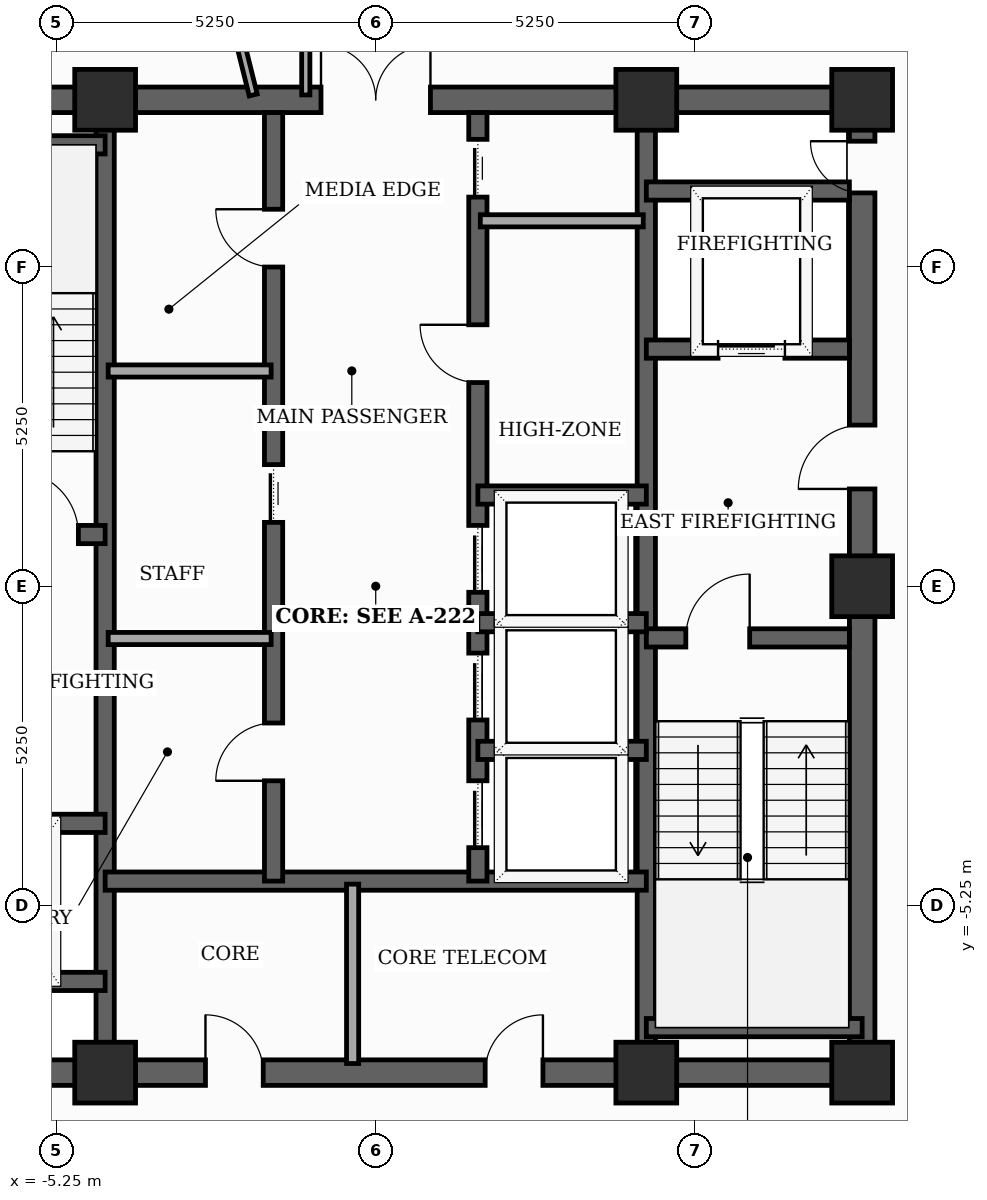
"""IFC4 building model, lengths in metres.
Left out: names, types, materials, properties, quantities, classifications, styles, units other than length and angle.
Written with IfcOpenShell. Run it as: python <this file> out.ifc"""

import sys

from ifc_helpers import new_model, si_unit, direction, frame, frame_2d, origin, origin_2d, place, context, subcontext, project, spatial, rectangle, extrude, element, fill, save


model = new_model("IFC4")
c1 = context("Model", 3, precision=1e-05, world=origin(), true_north=direction((0.0, 1.0)))
c2 = subcontext(c1, "Body", "Model", "MODEL_VIEW")
j1 = project(units=[si_unit("LENGTHUNIT", "METRE"), si_unit("PLANEANGLEUNIT", "RADIAN")], contexts=[c1])
p1 = place(None, origin())
s1 = spatial("IfcSite", under=j1, at=p1, CompositionType="ELEMENT")
p2 = place(p1, origin())
s2 = spatial("IfcBuilding", under=s1, at=p2, CompositionType="ELEMENT")
p3 = place(p2, frame((0.0, 0.0, 290.6)))
s3 = spatial("IfcBuildingStorey", under=s2, at=p3, CompositionType="ELEMENT", Elevation=290.6)
for number, where, z_axis, x_axis in (
    (1, (-4.45, -8.0, 0.0), (0.0, 0.0, 1.0), (1.0, 0.0, 0.0)),
    (2, (4.45, -8.0, 0.0), (0.0, 0.0, 1.0), (1.0, 0.0, 0.0)),
    (3, (8.0, -8.0, 0.0), (0.0, 0.0, 1.0), (1.0, 0.0, 0.0)),
    (4, (8.0, 0.0, 0.0), (0.0, 0.0, 1.0), (1.0, 0.0, 0.0)),
    (5, (8.0, 8.0, 0.0), (0.0, 0.0, 1.0), (1.0, 0.0, 0.0)),
    (6, (4.45, 8.0, 0.0), (0.0, 0.0, 1.0), (1.0, 0.0, 0.0)),
    (7, (-4.45, 8.0, 0.0), (0.0, 0.0, 1.0), (1.0, 0.0, 0.0)),
):
    element("IfcColumn", number, at=place(p3, frame(where, z_axis=z_axis, x_axis=x_axis)), inside=s3, PredefinedType="COLUMN", context=c2, shape_type="SweptSolid", body=[
        extrude(rectangle(XDim=1.0, YDim=1.0, at=origin_2d()), origin(), (0.0, 0.0, 1.0), 3.7),
    ])
p4 = place(p3, frame((8.0, -8.0, 0.0), z_axis=(0.0, 0.0, 1.0), x_axis=(0.0, 1.0, 0.0)))
e8 = element("IfcWall", 8, at=p4, inside=s3, PredefinedType="SHEAR", context=c2, shape_type="SweptSolid", body=[
    extrude(rectangle(XDim=16.0, YDim=0.42, at=frame_2d((8.0, 0.0))), origin(), (0.0, 0.0, 1.0), 3.5),
])
p5 = place(p4, frame((9.6, 0.0, 0.0)))
e9 = element("IfcOpeningElement", 9, at=p5, cuts=e8, PredefinedType="OPENING", context=c2, shape_type="SweptSolid", body=[
    extrude(rectangle(XDim=1.05, YDim=2.15, at=frame_2d((0.525, 1.075))), frame((0.0, 0.22, 0.0), z_axis=(0.0, -1.0, 0.0), x_axis=(1.0, 0.0, 0.0)), (0.0, 0.0, 1.0), 0.44),
])
p6 = place(p4, frame((14.469, 0.0, 0.0)))
e10 = element("IfcOpeningElement", 10, at=p6, cuts=e8, PredefinedType="OPENING", context=c2, shape_type="SweptSolid", body=[
    extrude(rectangle(XDim=0.85, YDim=2.02, at=frame_2d((0.425, 1.01))), frame((0.0, 0.22, 0.0), z_axis=(0.0, -1.0, 0.0), x_axis=(1.0, 0.0, 0.0)), (0.0, 0.0, 1.0), 0.44),
])
p7 = place(p3, frame((-8.0, -8.0, 0.0), z_axis=(0.0, 0.0, 1.0), x_axis=(1.0, 0.0, 0.0)))
e11 = element("IfcWall", 11, at=p7, inside=s3, PredefinedType="SHEAR", context=c2, shape_type="SweptSolid", body=[
    extrude(rectangle(XDim=16.0, YDim=0.42, at=frame_2d((8.0, 0.0))), origin(), (0.0, 0.0, 1.0), 3.5),
])
p8 = place(p7, frame((5.2, 0.0, 0.0)))
e12 = element("IfcOpeningElement", 12, at=p8, cuts=e11, PredefinedType="OPENING", context=c2, shape_type="SweptSolid", body=[
    extrude(rectangle(XDim=0.95, YDim=2.1, at=frame_2d((0.475, 1.05))), frame((0.0, 0.22, 0.0), z_axis=(0.0, -1.0, 0.0), x_axis=(1.0, 0.0, 0.0)), (0.0, 0.0, 1.0), 0.44),
])
p9 = place(p7, frame((9.8, 0.0, 0.0)))
e13 = element("IfcOpeningElement", 13, at=p9, cuts=e11, PredefinedType="OPENING", context=c2, shape_type="SweptSolid", body=[
    extrude(rectangle(XDim=0.95, YDim=2.1, at=frame_2d((0.475, 1.05))), frame((0.0, 0.22, 0.0), z_axis=(0.0, -1.0, 0.0), x_axis=(1.0, 0.0, 0.0)), (0.0, 0.0, 1.0), 0.44),
])
p10 = place(p3, frame((-8.0, 8.0, 0.0), z_axis=(0.0, 0.0, 1.0), x_axis=(1.0, 0.0, 0.0)))
e14 = element("IfcWall", 14, at=p10, inside=s3, PredefinedType="SHEAR", context=c2, shape_type="SweptSolid", body=[
    extrude(rectangle(XDim=16.0, YDim=0.42, at=frame_2d((8.0, 0.0))), origin(), (0.0, 0.0, 1.0), 3.5),
])
p11 = place(p10, frame((7.1, 0.0, 0.0)))
e15 = element("IfcOpeningElement", 15, at=p11, cuts=e14, PredefinedType="OPENING", context=c2, shape_type="SweptSolid", body=[
    extrude(rectangle(XDim=1.8, YDim=2.15, at=frame_2d((0.9, 1.075))), frame((0.0, 0.22, 0.0), z_axis=(0.0, -1.0, 0.0), x_axis=(1.0, 0.0, 0.0)), (0.0, 0.0, 1.0), 0.44),
])
for number, where, z_axis, x_axis in (
    (16, (-4.45, -7.79, 0.0), (0.0, 0.0, 1.0), (0.0, 1.0, 0.0)),
    (17, (4.45, -7.79, 0.0), (0.0, 0.0, 1.0), (0.0, 1.0, 0.0)),
):
    element("IfcWall", number, at=place(p3, frame(where, z_axis=z_axis, x_axis=x_axis)), inside=s3, PredefinedType="SHEAR", context=c2, shape_type="SweptSolid", body=[
        extrude(rectangle(XDim=15.58, YDim=0.3, at=frame_2d((7.79, 0.0))), origin(), (0.0, 0.0, 1.0), 3.5),
    ])
p12 = place(p3, frame((-7.79, 0.85, 0.0), z_axis=(0.0, 0.0, 1.0), x_axis=(1.0, 0.0, 0.0)))
e18 = element("IfcWall", 18, at=p12, inside=s3, PredefinedType="SHEAR", context=c2, shape_type="SweptSolid", body=[
    extrude(rectangle(XDim=3.34, YDim=0.3, at=frame_2d((1.67, 0.0))), origin(), (0.0, 0.0, 1.0), 3.5),
])
p13 = place(p12, frame((1.85, 0.0, 0.0)))
e19 = element("IfcOpeningElement", 19, at=p13, cuts=e18, PredefinedType="OPENING", context=c2, shape_type="SweptSolid", body=[
    extrude(rectangle(XDim=1.05, YDim=2.15, at=frame_2d((0.525, 1.075))), frame((0.0, 0.16, 0.0), z_axis=(0.0, -1.0, 0.0), x_axis=(1.0, 0.0, 0.0)), (0.0, 0.0, 1.0), 0.32),
])
p14 = place(p3, frame((-7.79, 7.26, 0.0), z_axis=(0.0, 0.0, 1.0), x_axis=(1.0, 0.0, 0.0)))
e20 = element("IfcWall", 20, at=p14, inside=s3, PredefinedType="SHEAR", context=c2, shape_type="SweptSolid", body=[
    extrude(rectangle(XDim=3.34, YDim=0.3, at=frame_2d((1.67, 0.0))), origin(), (0.0, 0.0, 1.0), 3.5),
])
p15 = place(p3, frame((4.45, -0.85, 0.0), z_axis=(0.0, 0.0, 1.0), x_axis=(1.0, 0.0, 0.0)))
e21 = element("IfcWall", 21, at=p15, inside=s3, PredefinedType="SHEAR", context=c2, shape_type="SweptSolid", body=[
    extrude(rectangle(XDim=3.34, YDim=0.3, at=frame_2d((1.67, 0.0))), origin(), (0.0, 0.0, 1.0), 3.5),
])
p16 = place(p15, frame((0.65, 0.0, 0.0)))
e22 = element("IfcOpeningElement", 22, at=p16, cuts=e21, PredefinedType="OPENING", context=c2, shape_type="SweptSolid", body=[
    extrude(rectangle(XDim=1.05, YDim=2.15, at=frame_2d((0.525, 1.075))), frame((0.0, 0.16, 0.0), z_axis=(0.0, -1.0, 0.0), x_axis=(1.0, 0.0, 0.0)), (0.0, 0.0, 1.0), 0.32),
])
p17 = place(p3, frame((4.45, -7.26, 0.0), z_axis=(0.0, 0.0, 1.0), x_axis=(1.0, 0.0, 0.0)))
e23 = element("IfcWall", 23, at=p17, inside=s3, PredefinedType="SHEAR", context=c2, shape_type="SweptSolid", body=[
    extrude(rectangle(XDim=3.55, YDim=0.3, at=frame_2d((1.775, 0.0))), origin(), (0.0, 0.0, 1.0), 3.5),
])
p18 = place(p3, frame((-7.79, -3.9, 0.0), z_axis=(0.0, 0.0, 1.0), x_axis=(1.0, 0.0, 0.0)))
e24 = element("IfcWall", 24, at=p18, inside=s3, PredefinedType="SHEAR", context=c2, shape_type="SweptSolid", body=[
    extrude(rectangle(XDim=3.34, YDim=0.3, at=frame_2d((1.67, 0.0))), origin(), (0.0, 0.0, 1.0), 3.5),
])
p19 = place(p18, frame((1.27, 0.0, 0.0)))
e25 = element("IfcOpeningElement", 25, at=p19, cuts=e24, PredefinedType="OPENING", context=c2, shape_type="SweptSolid", body=[
    extrude(rectangle(XDim=1.1, YDim=2.1, at=frame_2d((0.55, 1.05))), frame((0.0, 0.16, 0.0), z_axis=(0.0, -1.0, 0.0), x_axis=(1.0, 0.0, 0.0)), (0.0, 0.0, 1.0), 0.32),
])
p20 = place(p3, frame((-7.79, -6.5, 0.0), z_axis=(0.0, 0.0, 1.0), x_axis=(1.0, 0.0, 0.0)))
e26 = element("IfcWall", 26, at=p20, inside=s3, PredefinedType="SHEAR", context=c2, shape_type="SweptSolid", body=[
    extrude(rectangle(XDim=3.34, YDim=0.3, at=frame_2d((1.67, 0.0))), origin(), (0.0, 0.0, 1.0), 3.5),
])
p21 = place(p3, frame((4.45, 3.9, 0.0), z_axis=(0.0, 0.0, 1.0), x_axis=(1.0, 0.0, 0.0)))
e27 = element("IfcWall", 27, at=p21, inside=s3, PredefinedType="SHEAR", context=c2, shape_type="SweptSolid", body=[
    extrude(rectangle(XDim=3.34, YDim=0.3, at=frame_2d((1.67, 0.0))), origin(), (0.0, 0.0, 1.0), 3.5),
])
p22 = place(p21, frame((1.18, 0.0, 0.0)))
e28 = element("IfcOpeningElement", 28, at=p22, cuts=e27, PredefinedType="OPENING", context=c2, shape_type="SweptSolid", body=[
    extrude(rectangle(XDim=1.1, YDim=2.1, at=frame_2d((0.55, 1.05))), frame((0.0, 0.16, 0.0), z_axis=(0.0, -1.0, 0.0), x_axis=(1.0, 0.0, 0.0)), (0.0, 0.0, 1.0), 0.32),
])
p23 = place(p3, frame((4.45, 6.5, 0.0), z_axis=(0.0, 0.0, 1.0), x_axis=(1.0, 0.0, 0.0)))
e29 = element("IfcWall", 29, at=p23, inside=s3, PredefinedType="SHEAR", context=c2, shape_type="SweptSolid", body=[
    extrude(rectangle(XDim=3.34, YDim=0.3, at=frame_2d((1.67, 0.0))), origin(), (0.0, 0.0, 1.0), 3.5),
])
p24 = place(p3, frame((-4.45, -4.85, 0.0), z_axis=(0.0, 0.0, 1.0), x_axis=(1.0, 0.0, 0.0)))
e30 = element("IfcWall", 30, at=p24, inside=s3, PredefinedType="SHEAR", context=c2, shape_type="SweptSolid", body=[
    extrude(rectangle(XDim=8.9, YDim=0.3, at=frame_2d((4.45, 0.0))), origin(), (0.0, 0.0, 1.0), 3.5),
])
p25 = place(p3, frame((-1.68, -4.85, 0.0), z_axis=(0.0, 0.0, 1.0), x_axis=(0.0, 1.0, 0.0)))
e31 = element("IfcWall", 31, at=p25, inside=s3, PredefinedType="SHEAR", context=c2, shape_type="SweptSolid", body=[
    extrude(rectangle(XDim=12.64, YDim=0.3, at=frame_2d((6.32, 0.0))), origin(), (0.0, 0.0, 1.0), 3.5),
])
p26 = place(p25, frame((1.65, 0.0, 0.0)))
e32 = element("IfcOpeningElement", 32, at=p26, cuts=e31, PredefinedType="OPENING", context=c2, shape_type="SweptSolid", body=[
    extrude(rectangle(XDim=0.95, YDim=2.1, at=frame_2d((0.475, 1.05))), frame((0.0, 0.16, 0.0), z_axis=(0.0, -1.0, 0.0), x_axis=(1.0, 0.0, 0.0)), (0.0, 0.0, 1.0), 0.32),
])
p27 = place(p25, frame((5.9, 0.0, 0.0)))
e33 = element("IfcOpeningElement", 33, at=p27, cuts=e31, PredefinedType="OPENING", context=c2, shape_type="SweptSolid", body=[
    extrude(rectangle(XDim=0.95, YDim=2.1, at=frame_2d((0.475, 1.05))), frame((0.0, 0.16, 0.0), z_axis=(0.0, -1.0, 0.0), x_axis=(1.0, 0.0, 0.0)), (0.0, 0.0, 1.0), 0.32),
])
p28 = place(p25, frame((10.1, 0.0, 0.0)))
e34 = element("IfcOpeningElement", 34, at=p28, cuts=e31, PredefinedType="OPENING", context=c2, shape_type="SweptSolid", body=[
    extrude(rectangle(XDim=0.95, YDim=2.1, at=frame_2d((0.475, 1.05))), frame((0.0, 0.16, 0.0), z_axis=(0.0, -1.0, 0.0), x_axis=(1.0, 0.0, 0.0)), (0.0, 0.0, 1.0), 0.32),
])
p29 = place(p3, frame((1.68, -4.85, 0.0), z_axis=(0.0, 0.0, 1.0), x_axis=(0.0, 1.0, 0.0)))
e35 = element("IfcWall", 35, at=p29, inside=s3, PredefinedType="SHEAR", context=c2, shape_type="SweptSolid", body=[
    extrude(rectangle(XDim=12.64, YDim=0.3, at=frame_2d((6.32, 0.0))), origin(), (0.0, 0.0, 1.0), 3.5),
])
p30 = place(p29, frame((0.55, 0.0, 0.0)))
e36 = element("IfcOpeningElement", 36, at=p30, cuts=e35, PredefinedType="OPENING", context=c2, shape_type="SweptSolid", body=[
    extrude(rectangle(XDim=1.1, YDim=2.1, at=frame_2d((0.55, 1.05))), frame((0.0, 0.16, 0.0), z_axis=(0.0, -1.0, 0.0), x_axis=(1.0, 0.0, 0.0)), (0.0, 0.0, 1.0), 0.32),
])
p31 = place(p29, frame((2.65, 0.0, 0.0)))
e37 = element("IfcOpeningElement", 37, at=p31, cuts=e35, PredefinedType="OPENING", context=c2, shape_type="SweptSolid", body=[
    extrude(rectangle(XDim=1.1, YDim=2.1, at=frame_2d((0.55, 1.05))), frame((0.0, 0.16, 0.0), z_axis=(0.0, -1.0, 0.0), x_axis=(1.0, 0.0, 0.0)), (0.0, 0.0, 1.0), 0.32),
])
p32 = place(p29, frame((4.75, 0.0, 0.0)))
e38 = element("IfcOpeningElement", 38, at=p32, cuts=e35, PredefinedType="OPENING", context=c2, shape_type="SweptSolid", body=[
    extrude(rectangle(XDim=1.1, YDim=2.1, at=frame_2d((0.55, 1.05))), frame((0.0, 0.16, 0.0), z_axis=(0.0, -1.0, 0.0), x_axis=(1.0, 0.0, 0.0)), (0.0, 0.0, 1.0), 0.32),
])
p33 = place(p29, frame((8.2, 0.0, 0.0)))
e39 = element("IfcOpeningElement", 39, at=p33, cuts=e35, PredefinedType="OPENING", context=c2, shape_type="SweptSolid", body=[
    extrude(rectangle(XDim=0.95, YDim=2.1, at=frame_2d((0.475, 1.05))), frame((0.0, 0.16, 0.0), z_axis=(0.0, -1.0, 0.0), x_axis=(1.0, 0.0, 0.0)), (0.0, 0.0, 1.0), 0.32),
])
p34 = place(p29, frame((11.25, 0.0, 0.0)))
e40 = element("IfcOpeningElement", 40, at=p34, cuts=e35, PredefinedType="OPENING", context=c2, shape_type="SweptSolid", body=[
    extrude(rectangle(XDim=0.95, YDim=2.1, at=frame_2d((0.475, 1.05))), frame((0.0, 0.16, 0.0), z_axis=(0.0, -1.0, 0.0), x_axis=(1.0, 0.0, 0.0)), (0.0, 0.0, 1.0), 0.32),
])
for number, where, z_axis, x_axis in (
    (41, (1.68, 1.5, 0.0), (0.0, 0.0, 1.0), (1.0, 0.0, 0.0)),
    (42, (1.68, -2.7, 0.0), (0.0, 0.0, 1.0), (1.0, 0.0, 0.0)),
    (43, (1.68, -0.6, 0.0), (0.0, 0.0, 1.0), (1.0, 0.0, 0.0)),
):
    element("IfcWall", number, at=place(p3, frame(where, z_axis=z_axis, x_axis=x_axis)), inside=s3, PredefinedType="SHEAR", context=c2, shape_type="SweptSolid", body=[
        extrude(rectangle(XDim=2.77, YDim=0.3, at=frame_2d((1.385, 0.0))), origin(), (0.0, 0.0, 1.0), 3.5),
    ])
p35 = place(p3, frame((-0.38, -7.85, 0.0), z_axis=(0.0, 0.0, 1.0), x_axis=(0.0, 1.0, 0.0)))
e44 = element("IfcWall", 44, at=p35, inside=s3, PredefinedType="SOLIDWALL", context=c2, shape_type="SweptSolid", body=[
    extrude(rectangle(XDim=2.95, YDim=0.2, at=frame_2d((1.475, 0.0))), origin(), (0.0, 0.0, 1.0), 2.885),
])
for number, where, z_axis, x_axis in (
    (45, (-4.4, -0.86, 0.0), (0.0, 0.0, 1.0), (1.0, 0.0, 0.0)),
    (46, (-4.4, 3.54, 0.0), (0.0, 0.0, 1.0), (1.0, 0.0, 0.0)),
    (47, (1.72, 6.01, 0.0), (0.0, 0.0, 1.0), (1.0, 0.0, 0.0)),
):
    element("IfcWall", number, at=place(p3, frame(where, z_axis=z_axis, x_axis=x_axis)), inside=s3, PredefinedType="SOLIDWALL", context=c2, shape_type="SweptSolid", body=[
        extrude(rectangle(XDim=2.68, YDim=0.2, at=frame_2d((1.34, 0.0))), origin(), (0.0, 0.0, 1.0), 3.5),
    ])
p36 = place(p3, frame((-1.15, 10.65, 0.0), z_axis=(0.0, 0.0, 1.0), x_axis=(0.0, -1.0, 0.0)))
e48 = element("IfcWall", 48, at=p36, inside=s3, PredefinedType="PARTITIONING", context=c2, shape_type="SweptSolid", body=[
    extrude(rectangle(XDim=2.57, YDim=0.135, at=frame_2d((1.285, 0.0))), origin(), (0.0, 0.0, 1.0), 2.885),
])
p37 = place(p3, frame((-3.267, 13.104, 0.0), z_axis=(0.0, 0.0, 1.0), x_axis=(0.241825418424, -0.970319775643, 0.0)))
e49 = element("IfcWall", 49, at=p37, inside=s3, PredefinedType="PARTITIONING", context=c2, shape_type="SweptSolid", body=[
    extrude(rectangle(XDim=5.177, YDim=0.135, at=frame_2d((2.588, 0.0))), origin(), (0.0, 0.0, 1.0), 2.885),
])
p38 = place(p5, origin())
e50 = element("IfcDoor", 50, at=p38, inside=s3, OperationType="SINGLE_SWING_LEFT", PredefinedType="DOOR", context=c2, shape_type="SweptSolid", body=[
    extrude(rectangle(XDim=1.05, YDim=2.15, at=frame_2d((0.525, 1.075))), frame((0.0, 0.025, 0.0), z_axis=(0.0, -1.0, 0.0), x_axis=(1.0, 0.0, 0.0)), (0.0, 0.0, 1.0), 0.05),
])
fill(e9, e50)
p39 = place(p6, origin())
e51 = element("IfcDoor", 51, at=p39, inside=s3, OperationType="SINGLE_SWING_RIGHT", PredefinedType="TRAPDOOR", context=c2, shape_type="SweptSolid", body=[
    extrude(rectangle(XDim=0.85, YDim=2.02, at=frame_2d((0.425, 1.01))), frame((0.0, 0.025, 0.0), z_axis=(0.0, -1.0, 0.0), x_axis=(1.0, 0.0, 0.0)), (0.0, 0.0, 1.0), 0.05),
])
fill(e10, e51)
p40 = place(p8, origin())
e52 = element("IfcDoor", 52, at=p40, inside=s3, OperationType="SINGLE_SWING_LEFT", PredefinedType="DOOR", context=c2, shape_type="SweptSolid", body=[
    extrude(rectangle(XDim=0.95, YDim=2.1, at=frame_2d((0.475, 1.05))), frame((0.0, 0.025, 0.0), z_axis=(0.0, -1.0, 0.0), x_axis=(1.0, 0.0, 0.0)), (0.0, 0.0, 1.0), 0.05),
])
fill(e12, e52)
p41 = place(p9, origin())
e53 = element("IfcDoor", 53, at=p41, inside=s3, OperationType="SINGLE_SWING_RIGHT", PredefinedType="DOOR", context=c2, shape_type="SweptSolid", body=[
    extrude(rectangle(XDim=0.95, YDim=2.1, at=frame_2d((0.475, 1.05))), frame((0.0, 0.025, 0.0), z_axis=(0.0, -1.0, 0.0), x_axis=(1.0, 0.0, 0.0)), (0.0, 0.0, 1.0), 0.05),
])
fill(e13, e53)
p42 = place(p11, origin())
e54 = element("IfcDoor", 54, at=p42, inside=s3, OperationType="DOUBLE_DOOR_SINGLE_SWING", PredefinedType="DOOR", context=c2, shape_type="SweptSolid", body=[
    extrude(rectangle(XDim=1.8, YDim=2.15, at=frame_2d((0.9, 1.075))), frame((0.0, 0.025, 0.0), z_axis=(0.0, -1.0, 0.0), x_axis=(1.0, 0.0, 0.0)), (0.0, 0.0, 1.0), 0.05),
])
fill(e15, e54)
p43 = place(p13, origin())
e55 = element("IfcDoor", 55, at=p43, inside=s3, OperationType="SINGLE_SWING_LEFT", PredefinedType="DOOR", context=c2, shape_type="SweptSolid", body=[
    extrude(rectangle(XDim=1.05, YDim=2.15, at=frame_2d((0.525, 1.075))), frame((0.0, 0.025, 0.0), z_axis=(0.0, -1.0, 0.0), x_axis=(1.0, 0.0, 0.0)), (0.0, 0.0, 1.0), 0.05),
])
fill(e19, e55)
p44 = place(p16, origin())
e56 = element("IfcDoor", 56, at=p44, inside=s3, OperationType="SINGLE_SWING_RIGHT", PredefinedType="DOOR", context=c2, shape_type="SweptSolid", body=[
    extrude(rectangle(XDim=1.05, YDim=2.15, at=frame_2d((0.525, 1.075))), frame((0.0, 0.025, 0.0), z_axis=(0.0, -1.0, 0.0), x_axis=(1.0, 0.0, 0.0)), (0.0, 0.0, 1.0), 0.05),
])
fill(e22, e56)
p45 = place(p22, origin())
e57 = element("IfcDoor", 57, at=p45, inside=s3, OperationType="SLIDING_TO_LEFT", PredefinedType="DOOR", context=c2, shape_type="SweptSolid", body=[
    extrude(rectangle(XDim=1.1, YDim=2.1, at=frame_2d((0.55, 1.05))), frame((0.0, 0.025, 0.0), z_axis=(0.0, -1.0, 0.0), x_axis=(1.0, 0.0, 0.0)), (0.0, 0.0, 1.0), 0.05),
])
fill(e28, e57)
p46 = place(p26, origin())
e58 = element("IfcDoor", 58, at=p46, inside=s3, OperationType="SINGLE_SWING_LEFT", PredefinedType="DOOR", context=c2, shape_type="SweptSolid", body=[
    extrude(rectangle(XDim=0.95, YDim=2.1, at=frame_2d((0.475, 1.05))), frame((0.0, 0.025, 0.0), z_axis=(0.0, -1.0, 0.0), x_axis=(1.0, 0.0, 0.0)), (0.0, 0.0, 1.0), 0.05),
])
fill(e32, e58)
p47 = place(p27, origin())
e59 = element("IfcDoor", 59, at=p47, inside=s3, OperationType="SLIDING_TO_LEFT", PredefinedType="DOOR", context=c2, shape_type="SweptSolid", body=[
    extrude(rectangle(XDim=0.95, YDim=2.1, at=frame_2d((0.475, 1.05))), frame((0.0, 0.025, 0.0), z_axis=(0.0, -1.0, 0.0), x_axis=(1.0, 0.0, 0.0)), (0.0, 0.0, 1.0), 0.05),
])
fill(e33, e59)
p48 = place(p28, origin())
e60 = element("IfcDoor", 60, at=p48, inside=s3, OperationType="SINGLE_SWING_RIGHT", PredefinedType="DOOR", context=c2, shape_type="SweptSolid", body=[
    extrude(rectangle(XDim=0.95, YDim=2.1, at=frame_2d((0.475, 1.05))), frame((0.0, 0.025, 0.0), z_axis=(0.0, -1.0, 0.0), x_axis=(1.0, 0.0, 0.0)), (0.0, 0.0, 1.0), 0.05),
])
fill(e34, e60)
p49 = place(p30, origin())
e61 = element("IfcDoor", 61, at=p49, inside=s3, OperationType="SLIDING_TO_LEFT", PredefinedType="DOOR", context=c2, shape_type="SweptSolid", body=[
    extrude(rectangle(XDim=1.1, YDim=2.1, at=frame_2d((0.55, 1.05))), frame((0.0, 0.025, 0.0), z_axis=(0.0, -1.0, 0.0), x_axis=(1.0, 0.0, 0.0)), (0.0, 0.0, 1.0), 0.05),
])
fill(e36, e61)
p50 = place(p31, origin())
e62 = element("IfcDoor", 62, at=p50, inside=s3, OperationType="SLIDING_TO_LEFT", PredefinedType="DOOR", context=c2, shape_type="SweptSolid", body=[
    extrude(rectangle(XDim=1.1, YDim=2.1, at=frame_2d((0.55, 1.05))), frame((0.0, 0.025, 0.0), z_axis=(0.0, -1.0, 0.0), x_axis=(1.0, 0.0, 0.0)), (0.0, 0.0, 1.0), 0.05),
])
fill(e37, e62)
p51 = place(p32, origin())
e63 = element("IfcDoor", 63, at=p51, inside=s3, OperationType="SLIDING_TO_LEFT", PredefinedType="DOOR", context=c2, shape_type="SweptSolid", body=[
    extrude(rectangle(XDim=1.1, YDim=2.1, at=frame_2d((0.55, 1.05))), frame((0.0, 0.025, 0.0), z_axis=(0.0, -1.0, 0.0), x_axis=(1.0, 0.0, 0.0)), (0.0, 0.0, 1.0), 0.05),
])
fill(e38, e63)
p52 = place(p33, origin())
e64 = element("IfcDoor", 64, at=p52, inside=s3, OperationType="SINGLE_SWING_RIGHT", PredefinedType="DOOR", context=c2, shape_type="SweptSolid", body=[
    extrude(rectangle(XDim=0.95, YDim=2.1, at=frame_2d((0.475, 1.05))), frame((0.0, 0.025, 0.0), z_axis=(0.0, -1.0, 0.0), x_axis=(1.0, 0.0, 0.0)), (0.0, 0.0, 1.0), 0.05),
])
fill(e39, e64)
p53 = place(p34, origin())
e65 = element("IfcDoor", 65, at=p53, inside=s3, OperationType="SLIDING_TO_LEFT", PredefinedType="DOOR", context=c2, shape_type="SweptSolid", body=[
    extrude(rectangle(XDim=0.95, YDim=2.1, at=frame_2d((0.475, 1.05))), frame((0.0, 0.025, 0.0), z_axis=(0.0, -1.0, 0.0), x_axis=(1.0, 0.0, 0.0)), (0.0, 0.0, 1.0), 0.05),
])
fill(e40, e65)
save(model, sys.argv[1])
